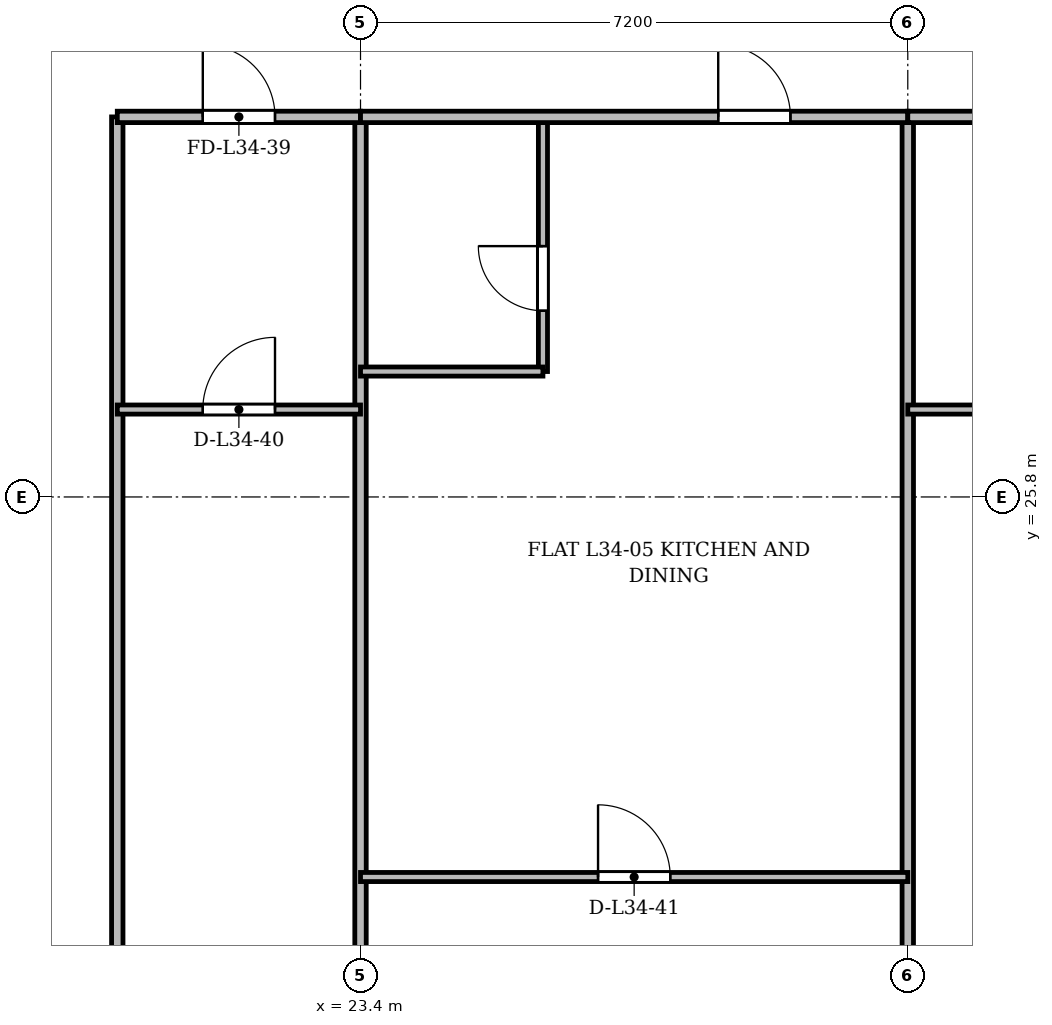
"""IFC4 building model, lengths in metres.
Left out: names, types, materials, properties, quantities, classifications, styles, units other than length and angle.
Written with IfcOpenShell. Run it as: python <this file> out.ifc"""

import sys

from ifc_helpers import new_model, si_unit, direction, frame, frame_2d, origin, place, context, subcontext, project, spatial, rectangle, extrude, source, transform, mapped, element, fill, save


model = new_model("IFC4")
c1 = context("Model", 3, precision=1e-05, world=origin(), true_north=direction((0.0, 1.0)))
c2 = subcontext(c1, "Body", "Model", "MODEL_VIEW")
j1 = project(units=[si_unit("LENGTHUNIT", "METRE"), si_unit("PLANEANGLEUNIT", "RADIAN")], contexts=[c1])
p1 = place(None, origin())
s1 = spatial("IfcSite", under=j1, at=p1, CompositionType="ELEMENT")
p2 = place(p1, origin())
s2 = spatial("IfcBuilding", under=s1, at=p2, CompositionType="ELEMENT")
p3 = place(p2, frame((0.0, 0.0, 132.1)))
s3 = spatial("IfcBuildingStorey", under=s2, at=p3, CompositionType="ELEMENT", Elevation=132.1)
for number, where, z_axis, x_axis in (
    (1, (23.4, 3.525, 0.0), (0.0, 0.0, 1.0), (0.0, 1.0, 0.0)),
    (2, (30.6, 3.525, 0.0), (0.0, 0.0, 1.0), (0.0, 1.0, 0.0)),
):
    element("IfcWall", number, at=place(p3, frame(where, z_axis=z_axis, x_axis=x_axis)), inside=s3, PredefinedType="PARTITIONING", context=c2, shape_type="SweptSolid", body=[
        extrude(rectangle(XDim=27.275, YDim=0.15, at=frame_2d((13.638, 0.0))), origin(), (0.0, 0.0, 1.0), 2.85),
    ])
p4 = place(p3, frame((20.2, 3.525, 0.0), z_axis=(0.0, 0.0, 1.0), x_axis=(0.0, 1.0, 0.0)))
e3 = element("IfcWall", 3, at=p4, inside=s3, PredefinedType="PARTITIONING", context=c2, shape_type="SweptSolid", body=[
    extrude(rectangle(XDim=27.275, YDim=0.15, at=frame_2d((13.638, 0.0))), origin(), (0.0, 0.0, 1.0), 2.75),
])
p5 = place(p3, frame((20.2, 30.8, 0.0), z_axis=(0.0, 0.0, 1.0), x_axis=(1.0, 0.0, 0.0)))
e4 = element("IfcWall", 4, at=p5, inside=s3, PredefinedType="PARTITIONING", context=c2, shape_type="SweptSolid", body=[
    extrude(rectangle(XDim=3.2, YDim=0.15, at=frame_2d((1.6, 0.0))), origin(), (0.0, 0.0, 1.0), 2.85),
])
p6 = place(p5, frame((1.125, 0.0, 0.0)))
e5 = element("IfcOpeningElement", 5, at=p6, cuts=e4, PredefinedType="OPENING", context=c2, shape_type="SweptSolid", body=[
    extrude(rectangle(XDim=0.95, YDim=2.15, at=frame_2d((0.475, 1.075))), frame((0.0, 0.085, 0.0), z_axis=(0.0, -1.0, 0.0), x_axis=(1.0, 0.0, 0.0)), (0.0, 0.0, 1.0), 0.17),
])
p7 = place(p3, frame((20.2, 26.95, 0.0), z_axis=(0.0, 0.0, 1.0), x_axis=(1.0, 0.0, 0.0)))
e6 = element("IfcWall", 6, at=p7, inside=s3, PredefinedType="PARTITIONING", context=c2, shape_type="SweptSolid", body=[
    extrude(rectangle(XDim=3.2, YDim=0.12, at=frame_2d((1.6, 0.0))), origin(), (0.0, 0.0, 1.0), 2.85),
])
p8 = place(p7, frame((1.125, 0.0, 0.0)))
e7 = element("IfcOpeningElement", 7, at=p8, cuts=e6, PredefinedType="OPENING", context=c2, shape_type="SweptSolid", body=[
    extrude(rectangle(XDim=0.95, YDim=2.15, at=frame_2d((0.475, 1.075))), frame((0.0, 0.07, 0.0), z_axis=(0.0, -1.0, 0.0), x_axis=(1.0, 0.0, 0.0)), (0.0, 0.0, 1.0), 0.14),
])
p9 = place(p3, frame((23.4, 20.8, 0.0), z_axis=(0.0, 0.0, 1.0), x_axis=(1.0, 0.0, 0.0)))
e8 = element("IfcWall", 8, at=p9, inside=s3, PredefinedType="PARTITIONING", context=c2, shape_type="SweptSolid", body=[
    extrude(rectangle(XDim=7.2, YDim=0.12, at=frame_2d((3.6, 0.0))), origin(), (0.0, 0.0, 1.0), 2.85),
])
p10 = place(p9, frame((3.125, 0.0, 0.0)))
e9 = element("IfcOpeningElement", 9, at=p10, cuts=e8, PredefinedType="OPENING", context=c2, shape_type="SweptSolid", body=[
    extrude(rectangle(XDim=0.95, YDim=2.15, at=frame_2d((0.475, 1.075))), frame((0.0, 0.07, 0.0), z_axis=(0.0, -1.0, 0.0), x_axis=(1.0, 0.0, 0.0)), (0.0, 0.0, 1.0), 0.14),
])
p11 = place(p3, frame((25.8, 27.45, 0.0), z_axis=(0.0, 0.0, 1.0), x_axis=(0.0, 1.0, 0.0)))
e10 = element("IfcWall", 10, at=p11, inside=s3, PredefinedType="PARTITIONING", context=c2, shape_type="SweptSolid", body=[
    extrude(rectangle(XDim=3.35, YDim=0.12, at=frame_2d((1.675, 0.0))), origin(), (0.0, 0.0, 1.0), 3.35),
])
p12 = place(p11, frame((0.8, 0.0, 0.0)))
e11 = element("IfcOpeningElement", 11, at=p12, cuts=e10, PredefinedType="OPENING", context=c2, shape_type="SweptSolid", body=[
    extrude(rectangle(XDim=0.85, YDim=2.1, at=frame_2d((0.425, 1.05))), frame((0.0, 0.07, 0.0), z_axis=(0.0, -1.0, 0.0), x_axis=(1.0, 0.0, 0.0)), (0.0, 0.0, 1.0), 0.14),
])
p13 = place(p3, frame((23.4, 27.45, 0.0), z_axis=(0.0, 0.0, 1.0), x_axis=(1.0, 0.0, 0.0)))
e12 = element("IfcWall", 12, at=p13, inside=s3, PredefinedType="PARTITIONING", context=c2, shape_type="SweptSolid", body=[
    extrude(rectangle(XDim=2.4, YDim=0.12, at=frame_2d((1.2, 0.0))), origin(), (0.0, 0.0, 1.0), 2.85),
])
p14 = place(p3, frame((23.4, 30.8, 0.0), z_axis=(0.0, 0.0, 1.0), x_axis=(1.0, 0.0, 0.0)))
e13 = element("IfcWall", 13, at=p14, inside=s3, PredefinedType="PARTITIONING", context=c2, shape_type="SweptSolid", body=[
    extrude(rectangle(XDim=7.2, YDim=0.15, at=frame_2d((3.6, 0.0))), origin(), (0.0, 0.0, 1.0), 2.85),
])
p15 = place(p14, frame((4.706, 0.0, 0.0)))
e14 = element("IfcOpeningElement", 14, at=p15, cuts=e13, PredefinedType="OPENING", context=c2, shape_type="SweptSolid", body=[
    extrude(rectangle(XDim=0.95, YDim=2.15, at=frame_2d((0.475, 1.075))), frame((0.0, 0.085, 0.0), z_axis=(0.0, -1.0, 0.0), x_axis=(1.0, 0.0, 0.0)), (0.0, 0.0, 1.0), 0.17),
])
p16 = place(p3, frame((30.6, 30.8, 0.0), z_axis=(0.0, 0.0, 1.0), x_axis=(1.0, 0.0, 0.0)))
e15 = element("IfcWall", 15, at=p16, inside=s3, PredefinedType="PARTITIONING", context=c2, shape_type="SweptSolid", body=[
    extrude(rectangle(XDim=6.6, YDim=0.15, at=frame_2d((3.3, 0.0))), origin(), (0.0, 0.0, 1.0), 2.85),
])
p17 = place(p16, frame((2.734, 0.0, 0.0)))
e16 = element("IfcOpeningElement", 16, at=p17, cuts=e15, PredefinedType="OPENING", context=c2, shape_type="SweptSolid", body=[
    extrude(rectangle(XDim=0.95, YDim=2.15, at=frame_2d((0.475, 1.075))), frame((0.0, 0.085, 0.0), z_axis=(0.0, -1.0, 0.0), x_axis=(1.0, 0.0, 0.0)), (0.0, 0.0, 1.0), 0.17),
])
p18 = place(p3, frame((30.6, 26.95, 0.0), z_axis=(0.0, 0.0, 1.0), x_axis=(1.0, 0.0, 0.0)))
e17 = element("IfcWall", 17, at=p18, inside=s3, PredefinedType="PARTITIONING", context=c2, shape_type="SweptSolid", body=[
    extrude(rectangle(XDim=6.6, YDim=0.12, at=frame_2d((3.3, 0.0))), origin(), (0.0, 0.0, 1.0), 2.85),
])
p19 = place(p18, frame((2.734, 0.0, 0.0)))
e18 = element("IfcOpeningElement", 18, at=p19, cuts=e17, PredefinedType="OPENING", context=c2, shape_type="SweptSolid", body=[
    extrude(rectangle(XDim=0.95, YDim=2.15, at=frame_2d((0.475, 1.075))), frame((0.0, 0.07, 0.0), z_axis=(0.0, -1.0, 0.0), x_axis=(1.0, 0.0, 0.0)), (0.0, 0.0, 1.0), 0.14),
])
m1 = source(origin(), c2, "Body", "SweptSolid", [
    extrude(rectangle(XDim=0.95, YDim=2.15, at=frame_2d((0.475, 1.075))), frame((0.0, 0.025, 0.0), z_axis=(0.0, -1.0, 0.0), x_axis=(1.0, 0.0, 0.0)), (0.0, 0.0, 1.0), 0.05),
])
p20 = place(p6, origin())
e19 = element("IfcDoor", 19, at=p20, inside=s3, OperationType="SINGLE_SWING_LEFT", PredefinedType="DOOR", context=c2, shape_type="MappedRepresentation", body=[
    mapped(m1, transform((0.0, 0.0, 0.0), x_axis=(1.0, 0.0, 0.0), y_axis=(0.0, 1.0, 0.0), z_axis=(0.0, 0.0, 1.0), scale=1.0)),
])
fill(e5, e19)
p21 = place(p8, origin())
e20 = element("IfcDoor", 20, at=p21, inside=s3, OperationType="SINGLE_SWING_RIGHT", PredefinedType="DOOR", context=c2, shape_type="MappedRepresentation", body=[
    mapped(m1, transform((0.0, 0.0, 0.0), x_axis=(1.0, 0.0, 0.0), y_axis=(0.0, 1.0, 0.0), z_axis=(0.0, 0.0, 1.0), scale=1.0)),
])
fill(e7, e20)
p22 = place(p10, origin())
e21 = element("IfcDoor", 21, at=p22, inside=s3, OperationType="SINGLE_SWING_LEFT", PredefinedType="DOOR", context=c2, shape_type="MappedRepresentation", body=[
    mapped(m1, transform((0.0, 0.0, 0.0), x_axis=(1.0, 0.0, 0.0), y_axis=(0.0, 1.0, 0.0), z_axis=(0.0, 0.0, 1.0), scale=1.0)),
])
fill(e9, e21)
m2 = source(origin(), c2, "Body", "SweptSolid", [
    extrude(rectangle(XDim=0.85, YDim=2.1, at=frame_2d((0.425, 1.05))), frame((0.0, 0.025, 0.0), z_axis=(0.0, -1.0, 0.0), x_axis=(1.0, 0.0, 0.0)), (0.0, 0.0, 1.0), 0.05),
])
p23 = place(p12, origin())
e22 = element("IfcDoor", 22, at=p23, inside=s3, OperationType="SINGLE_SWING_RIGHT", PredefinedType="DOOR", context=c2, shape_type="MappedRepresentation", body=[
    mapped(m2, transform((0.0, 0.0, 0.0), x_axis=(1.0, 0.0, 0.0), y_axis=(0.0, 1.0, 0.0), z_axis=(0.0, 0.0, 1.0), scale=1.0)),
])
fill(e11, e22)
p24 = place(p15, origin())
e23 = element("IfcDoor", 23, at=p24, inside=s3, OperationType="SINGLE_SWING_LEFT", PredefinedType="DOOR", context=c2, shape_type="MappedRepresentation", body=[
    mapped(m1, transform((0.0, 0.0, 0.0), x_axis=(1.0, 0.0, 0.0), y_axis=(0.0, 1.0, 0.0), z_axis=(0.0, 0.0, 1.0), scale=1.0)),
])
fill(e14, e23)
save(model, sys.argv[1])
